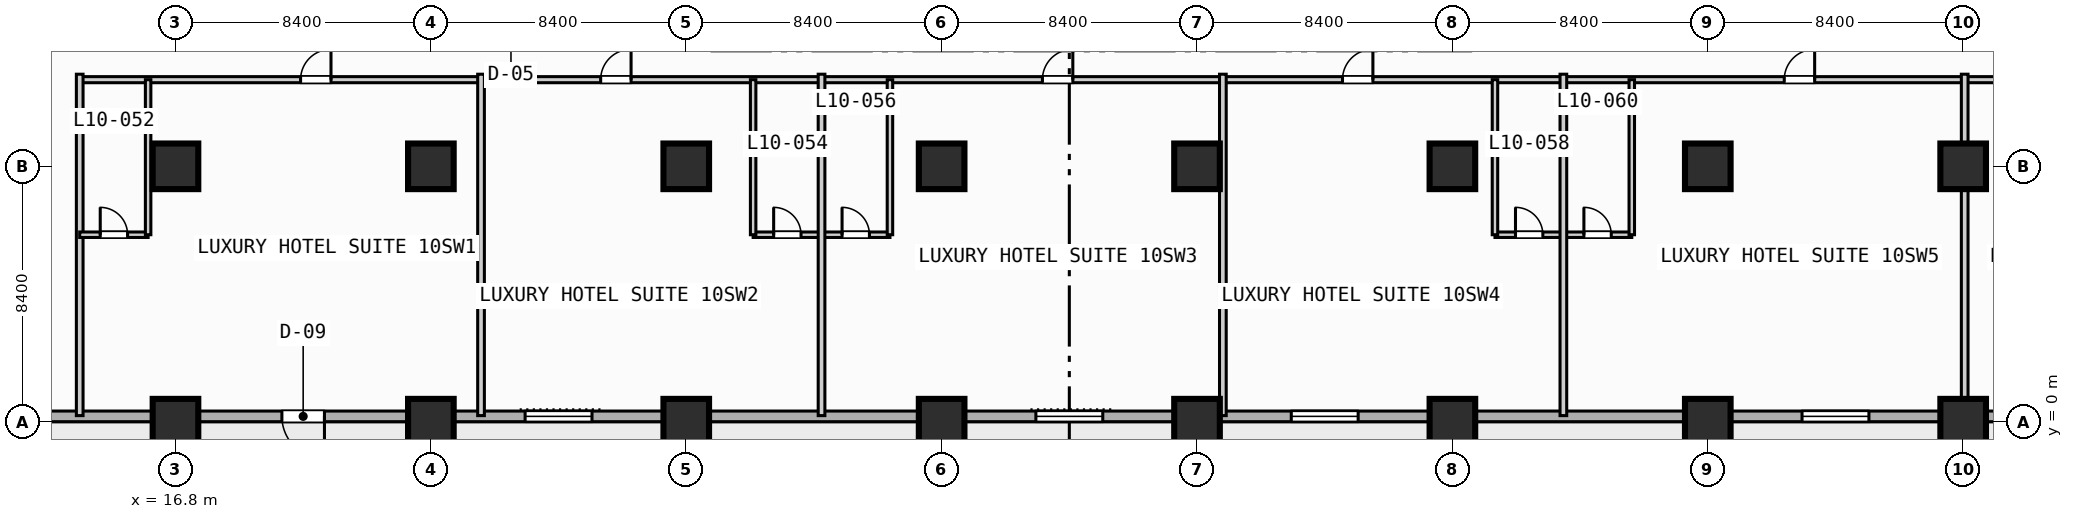
"""IFC4 building model, lengths in metres.
Left out: names, types, materials, properties, quantities, classifications, styles, units other than length and angle.
Written with IfcOpenShell. Run it as: python <this file> out.ifc"""

import sys

from ifc_helpers import new_model, si_unit, direction, frame, frame_2d, origin, origin_2d, place, context, subcontext, project, spatial, rectangle, extrude, element, fill, save


model = new_model("IFC4")
c1 = context("Model", 3, precision=1e-05, world=origin(), true_north=direction((0.0, 1.0)))
c2 = subcontext(c1, "Body", "Model", "MODEL_VIEW")
j1 = project(units=[si_unit("LENGTHUNIT", "METRE"), si_unit("PLANEANGLEUNIT", "RADIAN")], contexts=[c1])
p1 = place(None, origin())
s1 = spatial("IfcSite", under=j1, at=p1, CompositionType="ELEMENT")
p2 = place(p1, origin())
s2 = spatial("IfcBuilding", under=s1, at=p2, CompositionType="ELEMENT")
p3 = place(p2, frame((0.0, 0.0, 47.2)))
s3 = spatial("IfcBuildingStorey", under=s2, at=p3, CompositionType="ELEMENT", Elevation=47.2)
for number, where, z_axis, x_axis in (
    (1, (16.8, 0.0, 0.0), (0.0, 0.0, 1.0), (1.0, 0.0, 0.0)),
    (2, (16.8, 8.4, 0.0), (0.0, 0.0, 1.0), (1.0, 0.0, 0.0)),
    (3, (25.2, 0.0, 0.0), (0.0, 0.0, 1.0), (1.0, 0.0, 0.0)),
    (4, (25.2, 8.4, 0.0), (0.0, 0.0, 1.0), (1.0, 0.0, 0.0)),
    (5, (33.6, 0.0, 0.0), (0.0, 0.0, 1.0), (1.0, 0.0, 0.0)),
    (6, (33.6, 8.4, 0.0), (0.0, 0.0, 1.0), (1.0, 0.0, 0.0)),
    (7, (42.0, 0.0, 0.0), (0.0, 0.0, 1.0), (1.0, 0.0, 0.0)),
    (8, (42.0, 8.4, 0.0), (0.0, 0.0, 1.0), (1.0, 0.0, 0.0)),
    (9, (50.4, 0.0, 0.0), (0.0, 0.0, 1.0), (1.0, 0.0, 0.0)),
    (10, (50.4, 8.4, 0.0), (0.0, 0.0, 1.0), (1.0, 0.0, 0.0)),
    (11, (58.8, 0.0, 0.0), (0.0, 0.0, 1.0), (1.0, 0.0, 0.0)),
    (12, (58.8, 8.4, 0.0), (0.0, 0.0, 1.0), (1.0, 0.0, 0.0)),
    (13, (67.2, 0.0, 0.0), (0.0, 0.0, 1.0), (1.0, 0.0, 0.0)),
    (14, (67.2, 8.4, 0.0), (0.0, 0.0, 1.0), (1.0, 0.0, 0.0)),
    (15, (75.6, 0.0, 0.0), (0.0, 0.0, 1.0), (1.0, 0.0, 0.0)),
    (16, (75.6, 8.4, 0.0), (0.0, 0.0, 1.0), (1.0, 0.0, 0.0)),
):
    element("IfcColumn", number, at=place(p3, frame(where, z_axis=z_axis, x_axis=x_axis)), inside=s3, PredefinedType="COLUMN", context=c2, shape_type="SweptSolid", body=[
        extrude(rectangle(XDim=1.5, YDim=1.5, at=origin_2d()), origin(), (0.0, 0.0, 1.0), 3.8),
    ])
p4 = place(p3, frame((89.225, 0.175, 0.0), z_axis=(0.0, 0.0, 1.0), x_axis=(-1.0, 0.0, 0.0)))
e17 = element("IfcWall", 17, at=p4, inside=s3, PredefinedType="STANDARD", context=c2, shape_type="SweptSolid", body=[
    extrude(rectangle(XDim=86.05, YDim=0.35, at=frame_2d((43.025, 0.0))), origin(), (0.0, 0.0, 1.0), 3.55),
])
p5 = place(p4, frame((67.525, 0.0, 0.0)))
e18 = element("IfcOpeningElement", 18, at=p5, cuts=e17, PredefinedType="OPENING", context=c2, shape_type="SweptSolid", body=[
    extrude(rectangle(XDim=1.4, YDim=2.2, at=frame_2d((0.7, 1.1))), frame((0.0, 0.185, 0.0), z_axis=(0.0, -1.0, 0.0), x_axis=(1.0, 0.0, 0.0)), (0.0, 0.0, 1.0), 0.37),
])
p6 = place(p4, frame((58.725, 0.0, 0.85)))
e19 = element("IfcOpeningElement", 19, at=p6, cuts=e17, PredefinedType="OPENING", context=c2, shape_type="SweptSolid", body=[
    extrude(rectangle(XDim=2.2, YDim=1.8, at=frame_2d((1.1, 0.9))), frame((0.0, 0.185, 0.0), z_axis=(0.0, -1.0, 0.0), x_axis=(1.0, 0.0, 0.0)), (0.0, 0.0, 1.0), 0.37),
])
p7 = place(p4, frame((41.925, 0.0, 0.85)))
e20 = element("IfcOpeningElement", 20, at=p7, cuts=e17, PredefinedType="OPENING", context=c2, shape_type="SweptSolid", body=[
    extrude(rectangle(XDim=2.2, YDim=1.8, at=frame_2d((1.1, 0.9))), frame((0.0, 0.185, 0.0), z_axis=(0.0, -1.0, 0.0), x_axis=(1.0, 0.0, 0.0)), (0.0, 0.0, 1.0), 0.37),
])
p8 = place(p4, frame((33.525, 0.0, 0.85)))
e21 = element("IfcOpeningElement", 21, at=p8, cuts=e17, PredefinedType="OPENING", context=c2, shape_type="SweptSolid", body=[
    extrude(rectangle(XDim=2.2, YDim=1.8, at=frame_2d((1.1, 0.9))), frame((0.0, 0.185, 0.0), z_axis=(0.0, -1.0, 0.0), x_axis=(1.0, 0.0, 0.0)), (0.0, 0.0, 1.0), 0.37),
])
p9 = place(p4, frame((16.725, 0.0, 0.85)))
e22 = element("IfcOpeningElement", 22, at=p9, cuts=e17, PredefinedType="OPENING", context=c2, shape_type="SweptSolid", body=[
    extrude(rectangle(XDim=2.2, YDim=1.8, at=frame_2d((1.1, 0.9))), frame((0.0, 0.185, 0.0), z_axis=(0.0, -1.0, 0.0), x_axis=(1.0, 0.0, 0.0)), (0.0, 0.0, 1.0), 0.37),
])
p10 = place(p4, frame((8.325, 0.0, 0.85)))
e23 = element("IfcOpeningElement", 23, at=p10, cuts=e17, PredefinedType="OPENING", context=c2, shape_type="SweptSolid", body=[
    extrude(rectangle(XDim=2.2, YDim=1.8, at=frame_2d((1.1, 0.9))), frame((0.0, 0.185, 0.0), z_axis=(0.0, -1.0, 0.0), x_axis=(1.0, 0.0, 0.0)), (0.0, 0.0, 1.0), 0.37),
])
p11 = place(p3, frame((13.65, 11.25, 0.0), z_axis=(0.0, 0.0, 1.0), x_axis=(1.0, 0.0, 0.0)))
e24 = element("IfcWall", 24, at=p11, inside=s3, PredefinedType="PARTITIONING", context=c2, shape_type="SweptSolid", body=[
    extrude(rectangle(XDim=75.15, YDim=0.2, at=frame_2d((37.575, 0.0))), origin(), (0.0, 0.0, 1.0), 3.55),
])
p12 = place(p11, frame((7.265, 0.0, 0.0)))
e25 = element("IfcOpeningElement", 25, at=p12, cuts=e24, PredefinedType="OPENING", context=c2, shape_type="SweptSolid", body=[
    extrude(rectangle(XDim=1.0, YDim=2.15, at=frame_2d((0.5, 1.075))), frame((0.0, 0.11, 0.0), z_axis=(0.0, -1.0, 0.0), x_axis=(1.0, 0.0, 0.0)), (0.0, 0.0, 1.0), 0.22),
])
p13 = place(p11, frame((17.135, 0.0, 0.0)))
e26 = element("IfcOpeningElement", 26, at=p13, cuts=e24, PredefinedType="OPENING", context=c2, shape_type="SweptSolid", body=[
    extrude(rectangle(XDim=1.0, YDim=2.15, at=frame_2d((0.5, 1.075))), frame((0.0, 0.11, 0.0), z_axis=(0.0, -1.0, 0.0), x_axis=(1.0, 0.0, 0.0)), (0.0, 0.0, 1.0), 0.22),
])
p14 = place(p11, frame((31.665, 0.0, 0.0)))
e27 = element("IfcOpeningElement", 27, at=p14, cuts=e24, PredefinedType="OPENING", context=c2, shape_type="SweptSolid", body=[
    extrude(rectangle(XDim=1.0, YDim=2.15, at=frame_2d((0.5, 1.075))), frame((0.0, 0.11, 0.0), z_axis=(0.0, -1.0, 0.0), x_axis=(1.0, 0.0, 0.0)), (0.0, 0.0, 1.0), 0.22),
])
p15 = place(p11, frame((41.535, 0.0, 0.0)))
e28 = element("IfcOpeningElement", 28, at=p15, cuts=e24, PredefinedType="OPENING", context=c2, shape_type="SweptSolid", body=[
    extrude(rectangle(XDim=1.0, YDim=2.15, at=frame_2d((0.5, 1.075))), frame((0.0, 0.11, 0.0), z_axis=(0.0, -1.0, 0.0), x_axis=(1.0, 0.0, 0.0)), (0.0, 0.0, 1.0), 0.22),
])
p16 = place(p11, frame((56.065, 0.0, 0.0)))
e29 = element("IfcOpeningElement", 29, at=p16, cuts=e24, PredefinedType="OPENING", context=c2, shape_type="SweptSolid", body=[
    extrude(rectangle(XDim=1.0, YDim=2.15, at=frame_2d((0.5, 1.075))), frame((0.0, 0.11, 0.0), z_axis=(0.0, -1.0, 0.0), x_axis=(1.0, 0.0, 0.0)), (0.0, 0.0, 1.0), 0.22),
])
p17 = place(p11, frame((66.91, 0.0, 0.0)))
e30 = element("IfcOpeningElement", 30, at=p17, cuts=e24, PredefinedType="OPENING", context=c2, shape_type="SweptSolid", body=[
    extrude(rectangle(XDim=1.0, YDim=2.15, at=frame_2d((0.5, 1.075))), frame((0.0, 0.11, 0.0), z_axis=(0.0, -1.0, 0.0), x_axis=(1.0, 0.0, 0.0)), (0.0, 0.0, 1.0), 0.22),
])
p18 = place(p3, frame((13.65, 0.2, 0.0), z_axis=(0.0, 0.0, 1.0), x_axis=(0.0, 1.0, 0.0)))
e31 = element("IfcWall", 31, at=p18, inside=s3, PredefinedType="PARTITIONING", context=c2, shape_type="SweptSolid", body=[
    extrude(rectangle(XDim=11.23, YDim=0.22, at=frame_2d((5.615, 0.0))), origin(), (0.0, 0.0, 1.0), 3.55),
])
p19 = place(p3, frame((13.65, 6.15, 0.0), z_axis=(0.0, 0.0, 1.0), x_axis=(1.0, 0.0, 0.0)))
e32 = element("IfcWall", 32, at=p19, inside=s3, PredefinedType="PLUMBINGWALL", context=c2, shape_type="SweptSolid", body=[
    extrude(rectangle(XDim=2.25, YDim=0.18, at=frame_2d((1.125, 0.0))), origin(), (0.0, 0.0, 1.0), 3.55),
])
p20 = place(p19, frame((0.675, 0.0, 0.0)))
e33 = element("IfcOpeningElement", 33, at=p20, cuts=e32, PredefinedType="OPENING", context=c2, shape_type="SweptSolid", body=[
    extrude(rectangle(XDim=0.9, YDim=2.1, at=frame_2d((0.45, 1.05))), frame((0.0, 0.1, 0.0), z_axis=(0.0, -1.0, 0.0), x_axis=(1.0, 0.0, 0.0)), (0.0, 0.0, 1.0), 0.2),
])
p21 = place(p3, frame((15.9, 6.15, 0.0), z_axis=(0.0, 0.0, 1.0), x_axis=(0.0, 1.0, 0.0)))
e34 = element("IfcWall", 34, at=p21, inside=s3, PredefinedType="PLUMBINGWALL", context=c2, shape_type="SweptSolid", body=[
    extrude(rectangle(XDim=5.1, YDim=0.18, at=frame_2d((2.55, 0.0))), origin(), (0.0, 0.0, 1.0), 3.55),
])
p22 = place(p3, frame((26.85, 0.2, 0.0), z_axis=(0.0, 0.0, 1.0), x_axis=(0.0, 1.0, 0.0)))
e35 = element("IfcWall", 35, at=p22, inside=s3, PredefinedType="PARTITIONING", context=c2, shape_type="SweptSolid", body=[
    extrude(rectangle(XDim=11.23, YDim=0.22, at=frame_2d((5.615, 0.0))), origin(), (0.0, 0.0, 1.0), 3.55),
])
p23 = place(p3, frame((35.8, 6.15, 0.0), z_axis=(0.0, 0.0, 1.0), x_axis=(1.0, 0.0, 0.0)))
e36 = element("IfcWall", 36, at=p23, inside=s3, PredefinedType="PLUMBINGWALL", context=c2, shape_type="SweptSolid", body=[
    extrude(rectangle(XDim=4.5, YDim=0.18, at=frame_2d((2.25, 0.0))), origin(), (0.0, 0.0, 1.0), 3.55),
])
p24 = place(p23, frame((0.675, 0.0, 0.0)))
e37 = element("IfcOpeningElement", 37, at=p24, cuts=e36, PredefinedType="OPENING", context=c2, shape_type="SweptSolid", body=[
    extrude(rectangle(XDim=0.9, YDim=2.1, at=frame_2d((0.45, 1.05))), frame((0.0, 0.1, 0.0), z_axis=(0.0, -1.0, 0.0), x_axis=(1.0, 0.0, 0.0)), (0.0, 0.0, 1.0), 0.2),
])
p25 = place(p23, frame((2.925, 0.0, 0.0)))
e38 = element("IfcOpeningElement", 38, at=p25, cuts=e36, PredefinedType="OPENING", context=c2, shape_type="SweptSolid", body=[
    extrude(rectangle(XDim=0.9, YDim=2.1, at=frame_2d((0.45, 1.05))), frame((0.0, 0.1, 0.0), z_axis=(0.0, -1.0, 0.0), x_axis=(1.0, 0.0, 0.0)), (0.0, 0.0, 1.0), 0.2),
])
p26 = place(p3, frame((35.8, 6.15, 0.0), z_axis=(0.0, 0.0, 1.0), x_axis=(0.0, 1.0, 0.0)))
e39 = element("IfcWall", 39, at=p26, inside=s3, PredefinedType="PLUMBINGWALL", context=c2, shape_type="SweptSolid", body=[
    extrude(rectangle(XDim=5.1, YDim=0.18, at=frame_2d((2.55, 0.0))), origin(), (0.0, 0.0, 1.0), 3.55),
])
p27 = place(p3, frame((38.05, 0.2, 0.0), z_axis=(0.0, 0.0, 1.0), x_axis=(0.0, 1.0, 0.0)))
e40 = element("IfcWall", 40, at=p27, inside=s3, PredefinedType="PARTITIONING", context=c2, shape_type="SweptSolid", body=[
    extrude(rectangle(XDim=11.23, YDim=0.22, at=frame_2d((5.615, 0.0))), origin(), (0.0, 0.0, 1.0), 3.55),
])
p28 = place(p3, frame((40.3, 6.15, 0.0), z_axis=(0.0, 0.0, 1.0), x_axis=(0.0, 1.0, 0.0)))
e41 = element("IfcWall", 41, at=p28, inside=s3, PredefinedType="PLUMBINGWALL", context=c2, shape_type="SweptSolid", body=[
    extrude(rectangle(XDim=5.1, YDim=0.18, at=frame_2d((2.55, 0.0))), origin(), (0.0, 0.0, 1.0), 3.55),
])
p29 = place(p3, frame((51.25, 0.2, 0.0), z_axis=(0.0, 0.0, 1.0), x_axis=(0.0, 1.0, 0.0)))
e42 = element("IfcWall", 42, at=p29, inside=s3, PredefinedType="PARTITIONING", context=c2, shape_type="SweptSolid", body=[
    extrude(rectangle(XDim=11.23, YDim=0.22, at=frame_2d((5.615, 0.0))), origin(), (0.0, 0.0, 1.0), 3.55),
])
p30 = place(p3, frame((60.2, 6.15, 0.0), z_axis=(0.0, 0.0, 1.0), x_axis=(1.0, 0.0, 0.0)))
e43 = element("IfcWall", 43, at=p30, inside=s3, PredefinedType="PLUMBINGWALL", context=c2, shape_type="SweptSolid", body=[
    extrude(rectangle(XDim=4.5, YDim=0.18, at=frame_2d((2.25, 0.0))), origin(), (0.0, 0.0, 1.0), 3.55),
])
p31 = place(p30, frame((0.675, 0.0, 0.0)))
e44 = element("IfcOpeningElement", 44, at=p31, cuts=e43, PredefinedType="OPENING", context=c2, shape_type="SweptSolid", body=[
    extrude(rectangle(XDim=0.9, YDim=2.1, at=frame_2d((0.45, 1.05))), frame((0.0, 0.1, 0.0), z_axis=(0.0, -1.0, 0.0), x_axis=(1.0, 0.0, 0.0)), (0.0, 0.0, 1.0), 0.2),
])
p32 = place(p30, frame((2.925, 0.0, 0.0)))
e45 = element("IfcOpeningElement", 45, at=p32, cuts=e43, PredefinedType="OPENING", context=c2, shape_type="SweptSolid", body=[
    extrude(rectangle(XDim=0.9, YDim=2.1, at=frame_2d((0.45, 1.05))), frame((0.0, 0.1, 0.0), z_axis=(0.0, -1.0, 0.0), x_axis=(1.0, 0.0, 0.0)), (0.0, 0.0, 1.0), 0.2),
])
p33 = place(p3, frame((60.2, 6.15, 0.0), z_axis=(0.0, 0.0, 1.0), x_axis=(0.0, 1.0, 0.0)))
e46 = element("IfcWall", 46, at=p33, inside=s3, PredefinedType="PLUMBINGWALL", context=c2, shape_type="SweptSolid", body=[
    extrude(rectangle(XDim=5.1, YDim=0.18, at=frame_2d((2.55, 0.0))), origin(), (0.0, 0.0, 1.0), 3.55),
])
p34 = place(p3, frame((62.45, 0.2, 0.0), z_axis=(0.0, 0.0, 1.0), x_axis=(0.0, 1.0, 0.0)))
e47 = element("IfcWall", 47, at=p34, inside=s3, PredefinedType="PARTITIONING", context=c2, shape_type="SweptSolid", body=[
    extrude(rectangle(XDim=11.23, YDim=0.22, at=frame_2d((5.615, 0.0))), origin(), (0.0, 0.0, 1.0), 3.55),
])
p35 = place(p3, frame((64.7, 6.15, 0.0), z_axis=(0.0, 0.0, 1.0), x_axis=(0.0, 1.0, 0.0)))
e48 = element("IfcWall", 48, at=p35, inside=s3, PredefinedType="PLUMBINGWALL", context=c2, shape_type="SweptSolid", body=[
    extrude(rectangle(XDim=5.1, YDim=0.18, at=frame_2d((2.55, 0.0))), origin(), (0.0, 0.0, 1.0), 3.55),
])
p36 = place(p3, frame((75.65, 0.2, 0.0), z_axis=(0.0, 0.0, 1.0), x_axis=(0.0, 1.0, 0.0)))
e49 = element("IfcWall", 49, at=p36, inside=s3, PredefinedType="PARTITIONING", context=c2, shape_type="SweptSolid", body=[
    extrude(rectangle(XDim=11.23, YDim=0.22, at=frame_2d((5.615, 0.0))), origin(), (0.0, 0.0, 1.0), 2.8),
])
p37 = place(p5, origin())
e50 = element("IfcDoor", 50, at=p37, inside=s3, OperationType="SINGLE_SWING_LEFT", PredefinedType="DOOR", context=c2, shape_type="SweptSolid", body=[
    extrude(rectangle(XDim=1.4, YDim=2.2, at=frame_2d((0.7, 1.1))), frame((0.0, 0.025, 0.0), z_axis=(0.0, -1.0, 0.0), x_axis=(1.0, 0.0, 0.0)), (0.0, 0.0, 1.0), 0.05),
])
fill(e18, e50)
p38 = place(p6, origin())
e51 = element("IfcWindow", 51, at=p38, inside=s3, PartitioningType="SINGLE_PANEL", PredefinedType="WINDOW", context=c2, shape_type="SweptSolid", body=[
    extrude(rectangle(XDim=2.2, YDim=1.8, at=frame_2d((1.1, 0.9))), frame((0.0, 0.03, 0.0), z_axis=(0.0, -1.0, 0.0), x_axis=(1.0, 0.0, 0.0)), (0.0, 0.0, 1.0), 0.06),
])
fill(e19, e51)
p39 = place(p7, origin())
e52 = element("IfcWindow", 52, at=p39, inside=s3, PartitioningType="SINGLE_PANEL", PredefinedType="WINDOW", context=c2, shape_type="SweptSolid", body=[
    extrude(rectangle(XDim=2.2, YDim=1.8, at=frame_2d((1.1, 0.9))), frame((0.0, 0.03, 0.0), z_axis=(0.0, -1.0, 0.0), x_axis=(1.0, 0.0, 0.0)), (0.0, 0.0, 1.0), 0.06),
])
fill(e20, e52)
p40 = place(p8, origin())
e53 = element("IfcWindow", 53, at=p40, inside=s3, PartitioningType="SINGLE_PANEL", PredefinedType="WINDOW", context=c2, shape_type="SweptSolid", body=[
    extrude(rectangle(XDim=2.2, YDim=1.8, at=frame_2d((1.1, 0.9))), frame((0.0, 0.03, 0.0), z_axis=(0.0, -1.0, 0.0), x_axis=(1.0, 0.0, 0.0)), (0.0, 0.0, 1.0), 0.06),
])
fill(e21, e53)
p41 = place(p9, origin())
e54 = element("IfcWindow", 54, at=p41, inside=s3, PartitioningType="SINGLE_PANEL", PredefinedType="WINDOW", context=c2, shape_type="SweptSolid", body=[
    extrude(rectangle(XDim=2.2, YDim=1.8, at=frame_2d((1.1, 0.9))), frame((0.0, 0.03, 0.0), z_axis=(0.0, -1.0, 0.0), x_axis=(1.0, 0.0, 0.0)), (0.0, 0.0, 1.0), 0.06),
])
fill(e22, e54)
p42 = place(p12, origin())
e55 = element("IfcDoor", 55, at=p42, inside=s3, OperationType="SINGLE_SWING_RIGHT", PredefinedType="DOOR", context=c2, shape_type="SweptSolid", body=[
    extrude(rectangle(XDim=1.0, YDim=2.15, at=frame_2d((0.5, 1.075))), frame((0.0, 0.025, 0.0), z_axis=(0.0, -1.0, 0.0), x_axis=(1.0, 0.0, 0.0)), (0.0, 0.0, 1.0), 0.05),
])
fill(e25, e55)
p43 = place(p13, origin())
e56 = element("IfcDoor", 56, at=p43, inside=s3, OperationType="SINGLE_SWING_RIGHT", PredefinedType="DOOR", context=c2, shape_type="SweptSolid", body=[
    extrude(rectangle(XDim=1.0, YDim=2.15, at=frame_2d((0.5, 1.075))), frame((0.0, 0.025, 0.0), z_axis=(0.0, -1.0, 0.0), x_axis=(1.0, 0.0, 0.0)), (0.0, 0.0, 1.0), 0.05),
])
fill(e26, e56)
p44 = place(p14, origin())
e57 = element("IfcDoor", 57, at=p44, inside=s3, OperationType="SINGLE_SWING_RIGHT", PredefinedType="DOOR", context=c2, shape_type="SweptSolid", body=[
    extrude(rectangle(XDim=1.0, YDim=2.15, at=frame_2d((0.5, 1.075))), frame((0.0, 0.025, 0.0), z_axis=(0.0, -1.0, 0.0), x_axis=(1.0, 0.0, 0.0)), (0.0, 0.0, 1.0), 0.05),
])
fill(e27, e57)
p45 = place(p15, origin())
e58 = element("IfcDoor", 58, at=p45, inside=s3, OperationType="SINGLE_SWING_RIGHT", PredefinedType="DOOR", context=c2, shape_type="SweptSolid", body=[
    extrude(rectangle(XDim=1.0, YDim=2.15, at=frame_2d((0.5, 1.075))), frame((0.0, 0.025, 0.0), z_axis=(0.0, -1.0, 0.0), x_axis=(1.0, 0.0, 0.0)), (0.0, 0.0, 1.0), 0.05),
])
fill(e28, e58)
p46 = place(p16, origin())
e59 = element("IfcDoor", 59, at=p46, inside=s3, OperationType="SINGLE_SWING_RIGHT", PredefinedType="DOOR", context=c2, shape_type="SweptSolid", body=[
    extrude(rectangle(XDim=1.0, YDim=2.15, at=frame_2d((0.5, 1.075))), frame((0.0, 0.025, 0.0), z_axis=(0.0, -1.0, 0.0), x_axis=(1.0, 0.0, 0.0)), (0.0, 0.0, 1.0), 0.05),
])
fill(e29, e59)
p47 = place(p20, origin())
e60 = element("IfcDoor", 60, at=p47, inside=s3, OperationType="SINGLE_SWING_LEFT", PredefinedType="DOOR", context=c2, shape_type="SweptSolid", body=[
    extrude(rectangle(XDim=0.9, YDim=2.1, at=frame_2d((0.45, 1.05))), frame((0.0, 0.025, 0.0), z_axis=(0.0, -1.0, 0.0), x_axis=(1.0, 0.0, 0.0)), (0.0, 0.0, 1.0), 0.05),
])
fill(e33, e60)
p48 = place(p24, origin())
e61 = element("IfcDoor", 61, at=p48, inside=s3, OperationType="SINGLE_SWING_LEFT", PredefinedType="DOOR", context=c2, shape_type="SweptSolid", body=[
    extrude(rectangle(XDim=0.9, YDim=2.1, at=frame_2d((0.45, 1.05))), frame((0.0, 0.025, 0.0), z_axis=(0.0, -1.0, 0.0), x_axis=(1.0, 0.0, 0.0)), (0.0, 0.0, 1.0), 0.05),
])
fill(e37, e61)
p49 = place(p25, origin())
e62 = element("IfcDoor", 62, at=p49, inside=s3, OperationType="SINGLE_SWING_LEFT", PredefinedType="DOOR", context=c2, shape_type="SweptSolid", body=[
    extrude(rectangle(XDim=0.9, YDim=2.1, at=frame_2d((0.45, 1.05))), frame((0.0, 0.025, 0.0), z_axis=(0.0, -1.0, 0.0), x_axis=(1.0, 0.0, 0.0)), (0.0, 0.0, 1.0), 0.05),
])
fill(e38, e62)
p50 = place(p31, origin())
e63 = element("IfcDoor", 63, at=p50, inside=s3, OperationType="SINGLE_SWING_LEFT", PredefinedType="DOOR", context=c2, shape_type="SweptSolid", body=[
    extrude(rectangle(XDim=0.9, YDim=2.1, at=frame_2d((0.45, 1.05))), frame((0.0, 0.025, 0.0), z_axis=(0.0, -1.0, 0.0), x_axis=(1.0, 0.0, 0.0)), (0.0, 0.0, 1.0), 0.05),
])
fill(e44, e63)
p51 = place(p32, origin())
e64 = element("IfcDoor", 64, at=p51, inside=s3, OperationType="SINGLE_SWING_LEFT", PredefinedType="DOOR", context=c2, shape_type="SweptSolid", body=[
    extrude(rectangle(XDim=0.9, YDim=2.1, at=frame_2d((0.45, 1.05))), frame((0.0, 0.025, 0.0), z_axis=(0.0, -1.0, 0.0), x_axis=(1.0, 0.0, 0.0)), (0.0, 0.0, 1.0), 0.05),
])
fill(e45, e64)
save(model, sys.argv[1])
